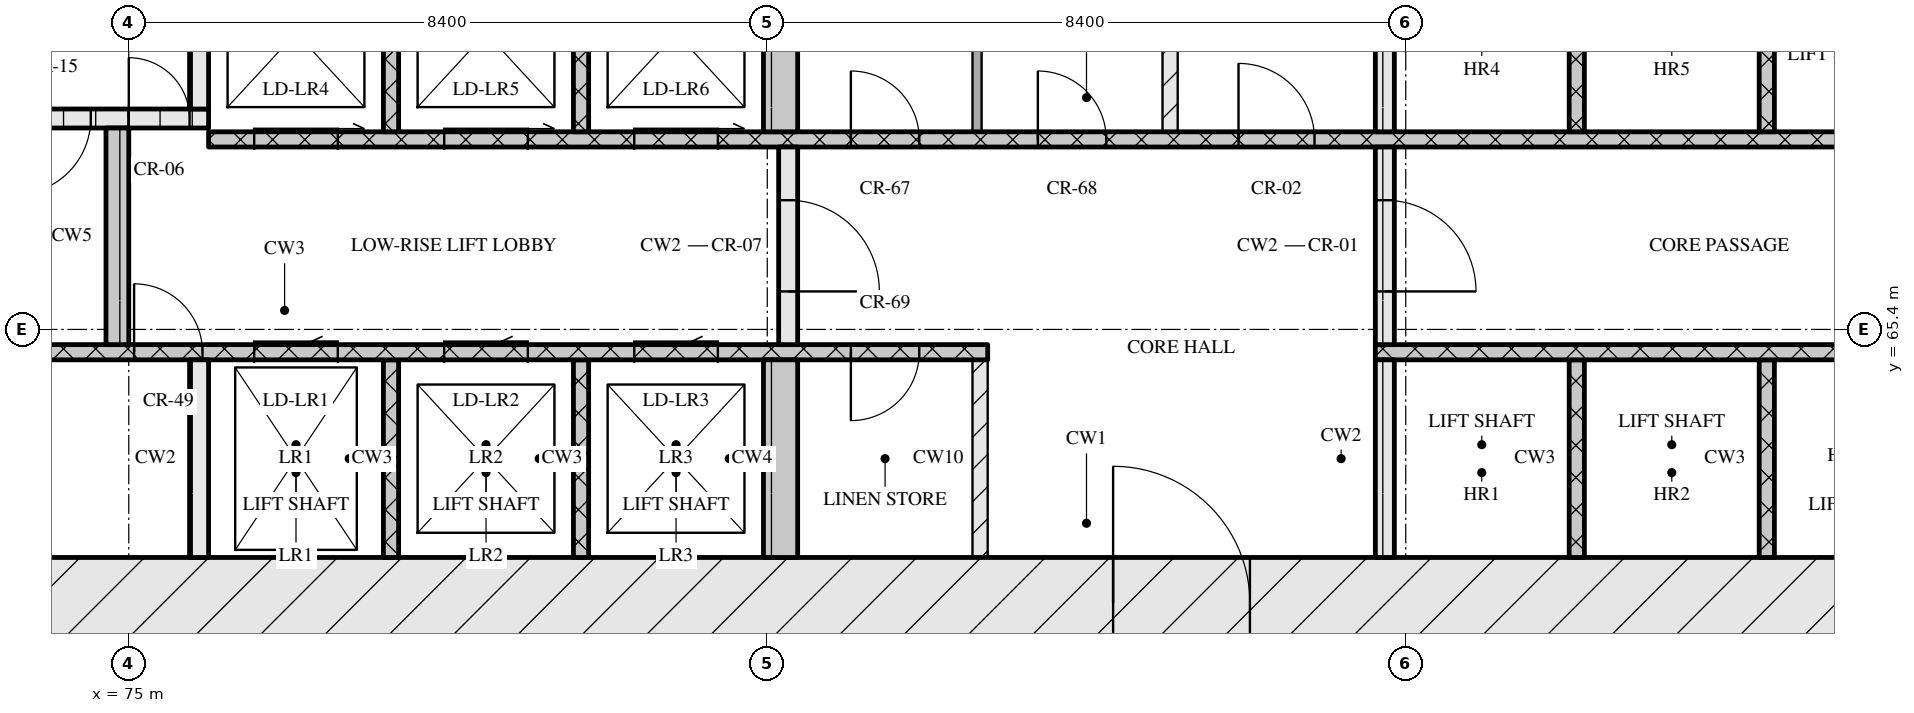
"""IFC4 building model, lengths in metres.
Left out: names, types, materials, properties, quantities, classifications, styles, units other than length and angle.
Written with IfcOpenShell. Run it as: python <this file> out.ifc"""

import sys

from ifc_helpers import new_model, si_unit, direction, frame, frame_2d, origin, place, context, subcontext, project, spatial, rectangle, extrude, element, fill, save


model = new_model("IFC4")
c1 = context("Model", 3, precision=1e-05, world=origin(), true_north=direction((0.0, 1.0)))
c2 = subcontext(c1, "Body", "Model", "MODEL_VIEW")
j1 = project(units=[si_unit("LENGTHUNIT", "METRE"), si_unit("PLANEANGLEUNIT", "RADIAN")], contexts=[c1])
p1 = place(None, origin())
s1 = spatial("IfcSite", under=j1, at=p1, CompositionType="ELEMENT")
p2 = place(p1, origin())
s2 = spatial("IfcBuilding", under=s1, at=p2, CompositionType="ELEMENT")
p3 = place(p2, frame((0.0, 0.0, 76.8)))
s3 = spatial("IfcBuildingStorey", under=s2, at=p3, CompositionType="ELEMENT", Elevation=76.8)
p4 = place(p3, frame((66.6, 61.8, 0.0), z_axis=(0.0, 0.0, 1.0), x_axis=(1.0, 0.0, 0.0)))
e1 = element("IfcWall", 1, at=p4, inside=s3, PredefinedType="SOLIDWALL", context=c2, shape_type="SweptSolid", body=[
    extrude(rectangle(XDim=42.0, YDim=1.2, at=frame_2d((21.0, 0.0))), origin(), (0.0, 0.0, 1.0), 3.32),
])
p5 = place(p4, frame((21.35, 0.0, 0.0)))
e2 = element("IfcOpeningElement", 2, at=p5, cuts=e1, PredefinedType="OPENING", context=c2, shape_type="SweptSolid", body=[
    extrude(rectangle(XDim=1.8, YDim=2.1, at=frame_2d((0.9, 1.05))), frame((0.0, 0.61, 0.0), z_axis=(0.0, -1.0, 0.0), x_axis=(1.0, 0.0, 0.0)), (0.0, 0.0, 1.0), 1.22),
])
p6 = place(p3, frame((75.925, 62.4, 0.0), z_axis=(0.0, 0.0, 1.0), x_axis=(0.0, 1.0, 0.0)))
e3 = element("IfcWall", 3, at=p6, inside=s3, PredefinedType="SOLIDWALL", context=c2, shape_type="SweptSolid", body=[
    extrude(rectangle(XDim=2.6, YDim=0.25, at=frame_2d((1.3, 0.0))), origin(), (0.0, 0.0, 1.0), 3.32),
])
for number, where, z_axis, x_axis in (
    (4, (78.45, 62.4, 0.0), (0.0, 0.0, 1.0), (0.0, 1.0, 0.0)),
    (5, (80.95, 62.4, 0.0), (0.0, 0.0, 1.0), (0.0, 1.0, 0.0)),
):
    element("IfcWall", number, at=place(p3, frame(where, z_axis=z_axis, x_axis=x_axis)), inside=s3, PredefinedType="SOLIDWALL", context=c2, shape_type="SweptSolid", body=[
        extrude(rectangle(XDim=2.6, YDim=0.2, at=frame_2d((1.3, 0.0))), origin(), (0.0, 0.0, 1.0), 3.32),
    ])
p7 = place(p3, frame((83.575, 62.4, 0.0), z_axis=(0.0, 0.0, 1.0), x_axis=(0.0, 1.0, 0.0)))
e6 = element("IfcWall", 6, at=p7, inside=s3, PredefinedType="SOLIDWALL", context=c2, shape_type="SweptSolid", body=[
    extrude(rectangle(XDim=2.6, YDim=0.45, at=frame_2d((1.3, 0.0))), origin(), (0.0, 0.0, 1.0), 3.32),
])
p8 = place(p3, frame((86.2, 62.4, 0.0), z_axis=(0.0, 0.0, 1.0), x_axis=(0.0, 1.0, 0.0)))
e7 = element("IfcWall", 7, at=p8, inside=s3, PredefinedType="PARTITIONING", context=c2, shape_type="SweptSolid", body=[
    extrude(rectangle(XDim=2.6, YDim=0.2, at=frame_2d((1.3, 0.0))), origin(), (0.0, 0.0, 1.0), 3.32),
])
p9 = place(p3, frame((91.525, 62.4, 0.0), z_axis=(0.0, 0.0, 1.0), x_axis=(0.0, 1.0, 0.0)))
e8 = element("IfcWall", 8, at=p9, inside=s3, PredefinedType="SOLIDWALL", context=c2, shape_type="SweptSolid", body=[
    extrude(rectangle(XDim=2.6, YDim=0.25, at=frame_2d((1.3, 0.0))), origin(), (0.0, 0.0, 1.0), 3.32),
])
for number, where, z_axis, x_axis in (
    (9, (94.05, 62.4, 0.0), (0.0, 0.0, 1.0), (0.0, 1.0, 0.0)),
    (10, (96.55, 62.4, 0.0), (0.0, 0.0, 1.0), (0.0, 1.0, 0.0)),
):
    element("IfcWall", number, at=place(p3, frame(where, z_axis=z_axis, x_axis=x_axis)), inside=s3, PredefinedType="SOLIDWALL", context=c2, shape_type="SweptSolid", body=[
        extrude(rectangle(XDim=2.6, YDim=0.2, at=frame_2d((1.3, 0.0))), origin(), (0.0, 0.0, 1.0), 3.32),
    ])
p10 = place(p3, frame((67.8, 65.1, 0.0), z_axis=(0.0, 0.0, 1.0), x_axis=(1.0, 0.0, 0.0)))
e11 = element("IfcWall", 11, at=p10, inside=s3, PredefinedType="SOLIDWALL", context=c2, shape_type="SweptSolid", body=[
    extrude(rectangle(XDim=18.5, YDim=0.2, at=frame_2d((9.25, 0.0))), origin(), (0.0, 0.0, 1.0), 3.32),
])
p11 = place(p10, frame((7.27, 0.0, 0.0)))
e12 = element("IfcOpeningElement", 12, at=p11, cuts=e11, PredefinedType="OPENING", context=c2, shape_type="SweptSolid", body=[
    extrude(rectangle(XDim=0.9, YDim=2.1, at=frame_2d((0.45, 1.05))), frame((0.0, 0.11, 0.0), z_axis=(0.0, -1.0, 0.0), x_axis=(1.0, 0.0, 0.0)), (0.0, 0.0, 1.0), 0.22),
])
p12 = place(p10, frame((8.85, 0.0, 0.0)))
e13 = element("IfcOpeningElement", 13, at=p12, cuts=e11, PredefinedType="OPENING", context=c2, shape_type="SweptSolid", body=[
    extrude(rectangle(XDim=1.1, YDim=2.1, at=frame_2d((0.55, 1.05))), frame((0.0, 0.11, 0.0), z_axis=(0.0, -1.0, 0.0), x_axis=(1.0, 0.0, 0.0)), (0.0, 0.0, 1.0), 0.22),
])
p13 = place(p10, frame((11.35, 0.0, 0.0)))
e14 = element("IfcOpeningElement", 14, at=p13, cuts=e11, PredefinedType="OPENING", context=c2, shape_type="SweptSolid", body=[
    extrude(rectangle(XDim=1.1, YDim=2.1, at=frame_2d((0.55, 1.05))), frame((0.0, 0.11, 0.0), z_axis=(0.0, -1.0, 0.0), x_axis=(1.0, 0.0, 0.0)), (0.0, 0.0, 1.0), 0.22),
])
p14 = place(p10, frame((13.85, 0.0, 0.0)))
e15 = element("IfcOpeningElement", 15, at=p14, cuts=e11, PredefinedType="OPENING", context=c2, shape_type="SweptSolid", body=[
    extrude(rectangle(XDim=1.1, YDim=2.1, at=frame_2d((0.55, 1.05))), frame((0.0, 0.11, 0.0), z_axis=(0.0, -1.0, 0.0), x_axis=(1.0, 0.0, 0.0)), (0.0, 0.0, 1.0), 0.22),
])
p15 = place(p10, frame((16.7, 0.0, 0.0)))
e16 = element("IfcOpeningElement", 16, at=p15, cuts=e11, PredefinedType="OPENING", context=c2, shape_type="SweptSolid", body=[
    extrude(rectangle(XDim=0.9, YDim=2.1, at=frame_2d((0.45, 1.05))), frame((0.0, 0.11, 0.0), z_axis=(0.0, -1.0, 0.0), x_axis=(1.0, 0.0, 0.0)), (0.0, 0.0, 1.0), 0.22),
])
p16 = place(p3, frame((91.4, 65.1, 0.0), z_axis=(0.0, 0.0, 1.0), x_axis=(1.0, 0.0, 0.0)))
e17 = element("IfcWall", 17, at=p16, inside=s3, PredefinedType="SOLIDWALL", context=c2, shape_type="SweptSolid", body=[
    extrude(rectangle(XDim=16.0, YDim=0.2, at=frame_2d((8.0, 0.0))), origin(), (0.0, 0.0, 1.0), 3.32),
])
p17 = place(p16, frame((7.83, 0.0, 0.0)))
e18 = element("IfcOpeningElement", 18, at=p17, cuts=e17, PredefinedType="OPENING", context=c2, shape_type="SweptSolid", body=[
    extrude(rectangle(XDim=0.9, YDim=2.1, at=frame_2d((0.45, 1.05))), frame((0.0, 0.11, 0.0), z_axis=(0.0, -1.0, 0.0), x_axis=(1.0, 0.0, 0.0)), (0.0, 0.0, 1.0), 0.22),
])
p18 = place(p3, frame((74.85, 65.2, 0.0), z_axis=(0.0, 0.0, 1.0), x_axis=(0.0, 1.0, 0.0)))
e19 = element("IfcWall", 19, at=p18, inside=s3, PredefinedType="SOLIDWALL", context=c2, shape_type="SweptSolid", body=[
    extrude(rectangle(XDim=2.85, YDim=0.3, at=frame_2d((1.425, 0.0))), origin(), (0.0, 0.0, 1.0), 3.32),
])
p19 = place(p3, frame((83.675, 65.2, 0.0), z_axis=(0.0, 0.0, 1.0), x_axis=(0.0, 1.0, 0.0)))
e20 = element("IfcWall", 20, at=p19, inside=s3, PredefinedType="SOLIDWALL", context=c2, shape_type="SweptSolid", body=[
    extrude(rectangle(XDim=2.6, YDim=0.25, at=frame_2d((1.3, 0.0))), origin(), (0.0, 0.0, 1.0), 3.32),
])
p20 = place(p19, frame((0.7, 0.0, 0.0)))
e21 = element("IfcOpeningElement", 21, at=p20, cuts=e20, PredefinedType="OPENING", context=c2, shape_type="SweptSolid", body=[
    extrude(rectangle(XDim=1.2, YDim=2.1, at=frame_2d((0.6, 1.05))), frame((0.0, 0.135, 0.0), z_axis=(0.0, -1.0, 0.0), x_axis=(1.0, 0.0, 0.0)), (0.0, 0.0, 1.0), 0.27),
])
p21 = place(p3, frame((91.525, 65.2, 0.0), z_axis=(0.0, 0.0, 1.0), x_axis=(0.0, 1.0, 0.0)))
e22 = element("IfcWall", 22, at=p21, inside=s3, PredefinedType="SOLIDWALL", context=c2, shape_type="SweptSolid", body=[
    extrude(rectangle(XDim=2.6, YDim=0.25, at=frame_2d((1.3, 0.0))), origin(), (0.0, 0.0, 1.0), 3.32),
])
p22 = place(p21, frame((0.7, 0.0, 0.0)))
e23 = element("IfcOpeningElement", 23, at=p22, cuts=e22, PredefinedType="OPENING", context=c2, shape_type="SweptSolid", body=[
    extrude(rectangle(XDim=1.2, YDim=2.1, at=frame_2d((0.6, 1.05))), frame((0.0, 0.135, 0.0), z_axis=(0.0, -1.0, 0.0), x_axis=(1.0, 0.0, 0.0)), (0.0, 0.0, 1.0), 0.27),
])
p23 = place(p3, frame((76.05, 67.9, 0.0), z_axis=(0.0, 0.0, 1.0), x_axis=(1.0, 0.0, 0.0)))
e24 = element("IfcWall", 24, at=p23, inside=s3, PredefinedType="SOLIDWALL", context=c2, shape_type="SweptSolid", body=[
    extrude(rectangle(XDim=23.1, YDim=0.2, at=frame_2d((11.55, 0.0))), origin(), (0.0, 0.0, 1.0), 3.32),
])
p24 = place(p23, frame((0.6, 0.0, 0.0)))
e25 = element("IfcOpeningElement", 25, at=p24, cuts=e24, PredefinedType="OPENING", context=c2, shape_type="SweptSolid", body=[
    extrude(rectangle(XDim=1.1, YDim=2.1, at=frame_2d((0.55, 1.05))), frame((0.0, 0.11, 0.0), z_axis=(0.0, -1.0, 0.0), x_axis=(1.0, 0.0, 0.0)), (0.0, 0.0, 1.0), 0.22),
])
p25 = place(p23, frame((3.1, 0.0, 0.0)))
e26 = element("IfcOpeningElement", 26, at=p25, cuts=e24, PredefinedType="OPENING", context=c2, shape_type="SweptSolid", body=[
    extrude(rectangle(XDim=1.1, YDim=2.1, at=frame_2d((0.55, 1.05))), frame((0.0, 0.11, 0.0), z_axis=(0.0, -1.0, 0.0), x_axis=(1.0, 0.0, 0.0)), (0.0, 0.0, 1.0), 0.22),
])
p26 = place(p23, frame((5.6, 0.0, 0.0)))
e27 = element("IfcOpeningElement", 27, at=p26, cuts=e24, PredefinedType="OPENING", context=c2, shape_type="SweptSolid", body=[
    extrude(rectangle(XDim=1.1, YDim=2.1, at=frame_2d((0.55, 1.05))), frame((0.0, 0.11, 0.0), z_axis=(0.0, -1.0, 0.0), x_axis=(1.0, 0.0, 0.0)), (0.0, 0.0, 1.0), 0.22),
])
p27 = place(p23, frame((8.45, 0.0, 0.0)))
e28 = element("IfcOpeningElement", 28, at=p27, cuts=e24, PredefinedType="OPENING", context=c2, shape_type="SweptSolid", body=[
    extrude(rectangle(XDim=0.9, YDim=2.1, at=frame_2d((0.45, 1.05))), frame((0.0, 0.11, 0.0), z_axis=(0.0, -1.0, 0.0), x_axis=(1.0, 0.0, 0.0)), (0.0, 0.0, 1.0), 0.22),
])
p28 = place(p23, frame((10.91, 0.0, 0.0)))
e29 = element("IfcOpeningElement", 29, at=p28, cuts=e24, PredefinedType="OPENING", context=c2, shape_type="SweptSolid", body=[
    extrude(rectangle(XDim=0.9, YDim=2.1, at=frame_2d((0.45, 1.05))), frame((0.0, 0.11, 0.0), z_axis=(0.0, -1.0, 0.0), x_axis=(1.0, 0.0, 0.0)), (0.0, 0.0, 1.0), 0.22),
])
p29 = place(p23, frame((13.55, 0.0, 0.0)))
e30 = element("IfcOpeningElement", 30, at=p29, cuts=e24, PredefinedType="OPENING", context=c2, shape_type="SweptSolid", body=[
    extrude(rectangle(XDim=1.0, YDim=2.1, at=frame_2d((0.5, 1.05))), frame((0.0, 0.11, 0.0), z_axis=(0.0, -1.0, 0.0), x_axis=(1.0, 0.0, 0.0)), (0.0, 0.0, 1.0), 0.22),
])
for number, where, z_axis, x_axis in (
    (31, (78.45, 68.0, 0.0), (0.0, 0.0, 1.0), (0.0, 1.0, 0.0)),
    (32, (80.95, 68.0, 0.0), (0.0, 0.0, 1.0), (0.0, 1.0, 0.0)),
):
    element("IfcWall", number, at=place(p3, frame(where, z_axis=z_axis, x_axis=x_axis)), inside=s3, PredefinedType="SOLIDWALL", context=c2, shape_type="SweptSolid", body=[
        extrude(rectangle(XDim=2.6, YDim=0.2, at=frame_2d((1.3, 0.0))), origin(), (0.0, 0.0, 1.0), 3.32),
    ])
p30 = place(p3, frame((83.575, 68.0, 0.0), z_axis=(0.0, 0.0, 1.0), x_axis=(0.0, 1.0, 0.0)))
e33 = element("IfcWall", 33, at=p30, inside=s3, PredefinedType="SOLIDWALL", context=c2, shape_type="SweptSolid", body=[
    extrude(rectangle(XDim=2.6, YDim=0.45, at=frame_2d((1.3, 0.0))), origin(), (0.0, 0.0, 1.0), 3.32),
])
p31 = place(p3, frame((86.16, 68.0, 0.0), z_axis=(0.0, 0.0, 1.0), x_axis=(0.0, 1.0, 0.0)))
e34 = element("IfcWall", 34, at=p31, inside=s3, PredefinedType="PARTITIONING", context=c2, shape_type="SweptSolid", body=[
    extrude(rectangle(XDim=2.6, YDim=0.12, at=frame_2d((1.3, 0.0))), origin(), (0.0, 0.0, 1.0), 3.32),
])
p32 = place(p3, frame((88.7, 68.0, 0.0), z_axis=(0.0, 0.0, 1.0), x_axis=(0.0, 1.0, 0.0)))
e35 = element("IfcWall", 35, at=p32, inside=s3, PredefinedType="PARTITIONING", context=c2, shape_type="SweptSolid", body=[
    extrude(rectangle(XDim=2.6, YDim=0.2, at=frame_2d((1.3, 0.0))), origin(), (0.0, 0.0, 1.0), 3.32),
])
p33 = place(p3, frame((91.525, 68.0, 0.0), z_axis=(0.0, 0.0, 1.0), x_axis=(0.0, 1.0, 0.0)))
e36 = element("IfcWall", 36, at=p33, inside=s3, PredefinedType="SOLIDWALL", context=c2, shape_type="SweptSolid", body=[
    extrude(rectangle(XDim=2.6, YDim=0.25, at=frame_2d((1.3, 0.0))), origin(), (0.0, 0.0, 1.0), 3.32),
])
for number, where, z_axis, x_axis in (
    (37, (94.05, 68.0, 0.0), (0.0, 0.0, 1.0), (0.0, 1.0, 0.0)),
    (38, (96.55, 68.0, 0.0), (0.0, 0.0, 1.0), (0.0, 1.0, 0.0)),
):
    element("IfcWall", number, at=place(p3, frame(where, z_axis=z_axis, x_axis=x_axis)), inside=s3, PredefinedType="SOLIDWALL", context=c2, shape_type="SweptSolid", body=[
        extrude(rectangle(XDim=2.6, YDim=0.2, at=frame_2d((1.3, 0.0))), origin(), (0.0, 0.0, 1.0), 3.32),
    ])
p34 = place(p3, frame((67.8, 68.175, 0.0), z_axis=(0.0, 0.0, 1.0), x_axis=(1.0, 0.0, 0.0)))
e39 = element("IfcWall", 39, at=p34, inside=s3, PredefinedType="SOLIDWALL", context=c2, shape_type="SweptSolid", body=[
    extrude(rectangle(XDim=8.25, YDim=0.25, at=frame_2d((4.125, 0.0))), origin(), (0.0, 0.0, 1.0), 3.32),
])
p35 = place(p34, frame((5.7, 0.0, 0.0)))
e40 = element("IfcOpeningElement", 40, at=p35, cuts=e39, PredefinedType="OPENING", context=c2, shape_type="SweptSolid", body=[
    extrude(rectangle(XDim=1.0, YDim=2.1, at=frame_2d((0.5, 1.05))), frame((0.0, 0.135, 0.0), z_axis=(0.0, -1.0, 0.0), x_axis=(1.0, 0.0, 0.0)), (0.0, 0.0, 1.0), 0.27),
])
p36 = place(p34, frame((7.2, 0.0, 0.0)))
e41 = element("IfcOpeningElement", 41, at=p36, cuts=e39, PredefinedType="OPENING", context=c2, shape_type="SweptSolid", body=[
    extrude(rectangle(XDim=0.8, YDim=2.1, at=frame_2d((0.4, 1.05))), frame((0.0, 0.135, 0.0), z_axis=(0.0, -1.0, 0.0), x_axis=(1.0, 0.0, 0.0)), (0.0, 0.0, 1.0), 0.27),
])
p37 = place(p3, frame((75.925, 68.3, 0.0), z_axis=(0.0, 0.0, 1.0), x_axis=(0.0, 1.0, 0.0)))
e42 = element("IfcWall", 42, at=p37, inside=s3, PredefinedType="SOLIDWALL", context=c2, shape_type="SweptSolid", body=[
    extrude(rectangle(XDim=2.3, YDim=0.25, at=frame_2d((1.15, 0.0))), origin(), (0.0, 0.0, 1.0), 3.32),
])
p38 = place(p5, origin())
e43 = element("IfcDoor", 43, at=p38, inside=s3, OperationType="DOUBLE_DOOR_SINGLE_SWING", PredefinedType="DOOR", context=c2, shape_type="SweptSolid", body=[
    extrude(rectangle(XDim=1.8, YDim=2.1, at=frame_2d((0.9, 1.05))), frame((0.0, 0.025, 0.0), z_axis=(0.0, -1.0, 0.0), x_axis=(1.0, 0.0, 0.0)), (0.0, 0.0, 1.0), 0.05),
])
fill(e2, e43)
p39 = place(p11, origin())
e44 = element("IfcDoor", 44, at=p39, inside=s3, OperationType="SINGLE_SWING_LEFT", PredefinedType="DOOR", context=c2, shape_type="SweptSolid", body=[
    extrude(rectangle(XDim=0.9, YDim=2.1, at=frame_2d((0.45, 1.05))), frame((0.0, 0.025, 0.0), z_axis=(0.0, -1.0, 0.0), x_axis=(1.0, 0.0, 0.0)), (0.0, 0.0, 1.0), 0.05),
])
fill(e12, e44)
p40 = place(p12, origin())
e45 = element("IfcDoor", 45, at=p40, inside=s3, OperationType="SLIDING_TO_LEFT", PredefinedType="DOOR", context=c2, shape_type="SweptSolid", body=[
    extrude(rectangle(XDim=1.1, YDim=2.1, at=frame_2d((0.55, 1.05))), frame((0.0, 0.025, 0.0), z_axis=(0.0, -1.0, 0.0), x_axis=(1.0, 0.0, 0.0)), (0.0, 0.0, 1.0), 0.05),
])
fill(e13, e45)
p41 = place(p13, origin())
e46 = element("IfcDoor", 46, at=p41, inside=s3, OperationType="SLIDING_TO_LEFT", PredefinedType="DOOR", context=c2, shape_type="SweptSolid", body=[
    extrude(rectangle(XDim=1.1, YDim=2.1, at=frame_2d((0.55, 1.05))), frame((0.0, 0.025, 0.0), z_axis=(0.0, -1.0, 0.0), x_axis=(1.0, 0.0, 0.0)), (0.0, 0.0, 1.0), 0.05),
])
fill(e14, e46)
p42 = place(p14, origin())
e47 = element("IfcDoor", 47, at=p42, inside=s3, OperationType="SLIDING_TO_LEFT", PredefinedType="DOOR", context=c2, shape_type="SweptSolid", body=[
    extrude(rectangle(XDim=1.1, YDim=2.1, at=frame_2d((0.55, 1.05))), frame((0.0, 0.025, 0.0), z_axis=(0.0, -1.0, 0.0), x_axis=(1.0, 0.0, 0.0)), (0.0, 0.0, 1.0), 0.05),
])
fill(e15, e47)
p43 = place(p15, origin())
e48 = element("IfcDoor", 48, at=p43, inside=s3, OperationType="SINGLE_SWING_RIGHT", PredefinedType="DOOR", context=c2, shape_type="SweptSolid", body=[
    extrude(rectangle(XDim=0.9, YDim=2.1, at=frame_2d((0.45, 1.05))), frame((0.0, 0.025, 0.0), z_axis=(0.0, -1.0, 0.0), x_axis=(1.0, 0.0, 0.0)), (0.0, 0.0, 1.0), 0.05),
])
fill(e16, e48)
p44 = place(p20, origin())
e49 = element("IfcDoor", 49, at=p44, inside=s3, OperationType="SINGLE_SWING_RIGHT", PredefinedType="DOOR", context=c2, shape_type="SweptSolid", body=[
    extrude(rectangle(XDim=1.2, YDim=2.1, at=frame_2d((0.6, 1.05))), frame((0.0, 0.025, 0.0), z_axis=(0.0, -1.0, 0.0), x_axis=(1.0, 0.0, 0.0)), (0.0, 0.0, 1.0), 0.05),
])
fill(e21, e49)
p45 = place(p22, origin())
e50 = element("IfcDoor", 50, at=p45, inside=s3, OperationType="SINGLE_SWING_RIGHT", PredefinedType="DOOR", context=c2, shape_type="SweptSolid", body=[
    extrude(rectangle(XDim=1.2, YDim=2.1, at=frame_2d((0.6, 1.05))), frame((0.0, 0.025, 0.0), z_axis=(0.0, -1.0, 0.0), x_axis=(1.0, 0.0, 0.0)), (0.0, 0.0, 1.0), 0.05),
])
fill(e23, e50)
p46 = place(p24, origin())
e51 = element("IfcDoor", 51, at=p46, inside=s3, OperationType="SLIDING_TO_RIGHT", PredefinedType="DOOR", context=c2, shape_type="SweptSolid", body=[
    extrude(rectangle(XDim=1.1, YDim=2.1, at=frame_2d((0.55, 1.05))), frame((0.0, 0.025, 0.0), z_axis=(0.0, -1.0, 0.0), x_axis=(1.0, 0.0, 0.0)), (0.0, 0.0, 1.0), 0.05),
])
fill(e25, e51)
p47 = place(p25, origin())
e52 = element("IfcDoor", 52, at=p47, inside=s3, OperationType="SLIDING_TO_RIGHT", PredefinedType="DOOR", context=c2, shape_type="SweptSolid", body=[
    extrude(rectangle(XDim=1.1, YDim=2.1, at=frame_2d((0.55, 1.05))), frame((0.0, 0.025, 0.0), z_axis=(0.0, -1.0, 0.0), x_axis=(1.0, 0.0, 0.0)), (0.0, 0.0, 1.0), 0.05),
])
fill(e26, e52)
p48 = place(p26, origin())
e53 = element("IfcDoor", 53, at=p48, inside=s3, OperationType="SLIDING_TO_RIGHT", PredefinedType="DOOR", context=c2, shape_type="SweptSolid", body=[
    extrude(rectangle(XDim=1.1, YDim=2.1, at=frame_2d((0.55, 1.05))), frame((0.0, 0.025, 0.0), z_axis=(0.0, -1.0, 0.0), x_axis=(1.0, 0.0, 0.0)), (0.0, 0.0, 1.0), 0.05),
])
fill(e27, e53)
p49 = place(p27, origin())
e54 = element("IfcDoor", 54, at=p49, inside=s3, OperationType="SINGLE_SWING_LEFT", PredefinedType="DOOR", context=c2, shape_type="SweptSolid", body=[
    extrude(rectangle(XDim=0.9, YDim=2.1, at=frame_2d((0.45, 1.05))), frame((0.0, 0.025, 0.0), z_axis=(0.0, -1.0, 0.0), x_axis=(1.0, 0.0, 0.0)), (0.0, 0.0, 1.0), 0.05),
])
fill(e28, e54)
p50 = place(p28, origin())
e55 = element("IfcDoor", 55, at=p50, inside=s3, OperationType="SINGLE_SWING_LEFT", PredefinedType="DOOR", context=c2, shape_type="SweptSolid", body=[
    extrude(rectangle(XDim=0.9, YDim=2.1, at=frame_2d((0.45, 1.05))), frame((0.0, 0.025, 0.0), z_axis=(0.0, -1.0, 0.0), x_axis=(1.0, 0.0, 0.0)), (0.0, 0.0, 1.0), 0.05),
])
fill(e29, e55)
p51 = place(p29, origin())
e56 = element("IfcDoor", 56, at=p51, inside=s3, OperationType="SINGLE_SWING_LEFT", PredefinedType="DOOR", context=c2, shape_type="SweptSolid", body=[
    extrude(rectangle(XDim=1.0, YDim=2.1, at=frame_2d((0.5, 1.05))), frame((0.0, 0.025, 0.0), z_axis=(0.0, -1.0, 0.0), x_axis=(1.0, 0.0, 0.0)), (0.0, 0.0, 1.0), 0.05),
])
fill(e30, e56)
p52 = place(p35, origin())
e57 = element("IfcDoor", 57, at=p52, inside=s3, OperationType="SINGLE_SWING_RIGHT", PredefinedType="DOOR", context=c2, shape_type="SweptSolid", body=[
    extrude(rectangle(XDim=1.0, YDim=2.1, at=frame_2d((0.5, 1.05))), frame((0.0, 0.025, 0.0), z_axis=(0.0, -1.0, 0.0), x_axis=(1.0, 0.0, 0.0)), (0.0, 0.0, 1.0), 0.05),
])
fill(e40, e57)
p53 = place(p36, origin())
e58 = element("IfcDoor", 58, at=p53, inside=s3, OperationType="SINGLE_SWING_LEFT", PredefinedType="DOOR", context=c2, shape_type="SweptSolid", body=[
    extrude(rectangle(XDim=0.8, YDim=2.1, at=frame_2d((0.4, 1.05))), frame((0.0, 0.025, 0.0), z_axis=(0.0, -1.0, 0.0), x_axis=(1.0, 0.0, 0.0)), (0.0, 0.0, 1.0), 0.05),
])
fill(e41, e58)
save(model, sys.argv[1])
